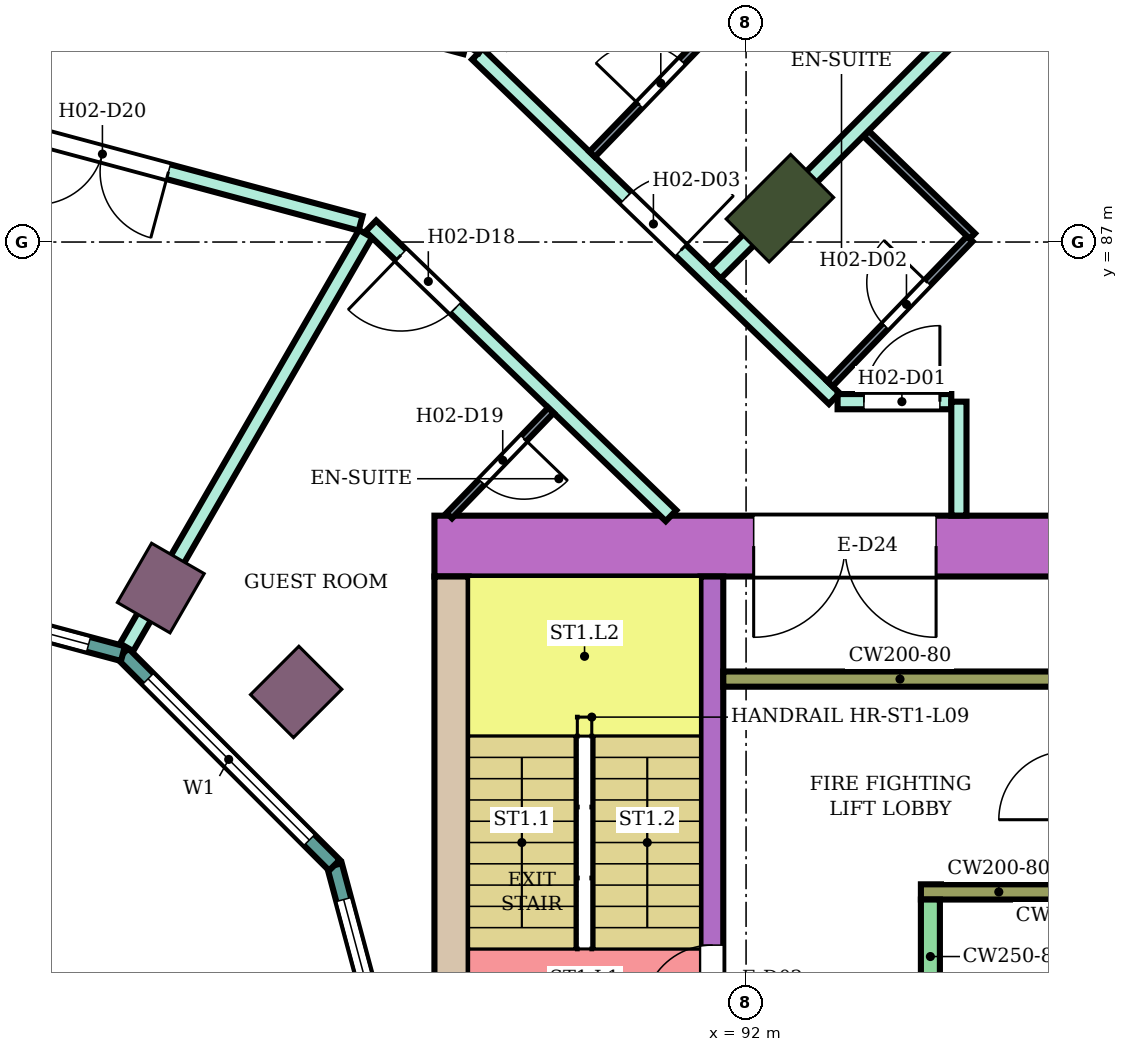
"""IFC4 building model, lengths in metres.
Left out: names, types, materials, properties, quantities, classifications, styles, units other than length and angle.
Written with IfcOpenShell. Run it as: python <this file> out.ifc"""

import sys

from ifc_helpers import new_model, si_unit, direction, frame, frame_2d, origin, origin_2d, place, context, subcontext, project, spatial, rectangle, extrude, element, fill, save


model = new_model("IFC4")
c1 = context("Model", 3, precision=1e-05, world=origin(), true_north=direction((0.0, 1.0)))
c2 = subcontext(c1, "Body", "Model", "MODEL_VIEW")
j1 = project(units=[si_unit("LENGTHUNIT", "METRE"), si_unit("PLANEANGLEUNIT", "RADIAN")], contexts=[c1])
p1 = place(None, origin())
s1 = spatial("IfcSite", under=j1, at=p1, CompositionType="ELEMENT")
p2 = place(p1, origin())
s2 = spatial("IfcBuilding", under=s1, at=p2, CompositionType="ELEMENT")
p3 = place(p2, frame((0.0, 0.0, 44.0)))
s3 = spatial("IfcBuildingStorey", under=s2, at=p3, CompositionType="ELEMENT", Elevation=44.0)
p4 = place(p3, frame((92.445, 87.445, 0.0), z_axis=(0.0, 0.0, 1.0), x_axis=(0.707106781187, 0.707106781187, 0.0)))
e1 = element("IfcColumn", 1, at=p4, inside=s3, PredefinedType="COLUMN", context=c2, shape_type="SweptSolid", body=[
    extrude(rectangle(XDim=1.2, YDim=0.8, at=origin_2d()), origin(), (0.0, 0.0, 1.0), 3.8),
])
for number, where, z_axis, x_axis in (
    (2, (86.081, 81.081, 0.0), (0.0, 0.0, 1.0), (0.707, 0.707, 0.0)),
    (3, (84.3, 82.448, 0.0), (0.0, 0.0, 1.0), (0.5, 0.866, 0.0)),
):
    element("IfcColumn", number, at=place(p3, frame(where, z_axis=z_axis, x_axis=x_axis)), inside=s3, PredefinedType="COLUMN", context=c2, shape_type="SweptSolid", body=[
        extrude(rectangle(XDim=0.9, YDim=0.8, at=origin_2d()), origin(), (0.0, 0.0, 1.0), 3.8),
    ])
p5 = place(p3, frame((95.91, 90.91, 0.0), z_axis=(0.0, 0.0, 1.0), x_axis=(0.707106781187, 0.707106781187, 0.0)))
e4 = element("IfcColumn", 4, at=p5, inside=s3, PredefinedType="COLUMN", context=c2, shape_type="SweptSolid", body=[
    extrude(rectangle(XDim=1.8, YDim=2.4, at=origin_2d()), origin(), (0.0, 0.0, 1.0), 3.8),
])
p6 = place(p3, frame((87.9, 83.0, 0.0), z_axis=(0.0, 0.0, 1.0), x_axis=(1.0, 0.0, 0.0)))
e5 = element("IfcWall", 5, at=p6, inside=s3, PredefinedType="SHEAR", context=c2, shape_type="SweptSolid", body=[
    extrude(rectangle(XDim=14.7, YDim=0.8, at=frame_2d((7.35, 0.0))), origin(), (0.0, 0.0, 1.0), 3.48),
])
p7 = place(p6, frame((4.2, 0.0, 0.0)))
e6 = element("IfcOpeningElement", 6, at=p7, cuts=e5, PredefinedType="OPENING", context=c2, shape_type="SweptSolid", body=[
    extrude(rectangle(XDim=2.4, YDim=2.4, at=frame_2d((1.2, 1.2))), frame((0.0, 0.41, 0.0), z_axis=(0.0, -1.0, 0.0), x_axis=(1.0, 0.0, 0.0)), (0.0, 0.0, 1.0), 0.82),
])
p8 = place(p3, frame((88.125, 75.0, 0.0), z_axis=(0.0, 0.0, 1.0), x_axis=(0.0, 1.0, 0.0)))
e7 = element("IfcWall", 7, at=p8, inside=s3, PredefinedType="SHEAR", context=c2, shape_type="SweptSolid", body=[
    extrude(rectangle(XDim=7.6, YDim=0.45, at=frame_2d((3.8, 0.0))), origin(), (0.0, 0.0, 1.0), 3.48),
])
p9 = place(p3, frame((91.55, 75.0, 0.0), z_axis=(0.0, 0.0, 1.0), x_axis=(0.0, 1.0, 0.0)))
e8 = element("IfcWall", 8, at=p9, inside=s3, PredefinedType="SHEAR", context=c2, shape_type="SweptSolid", body=[
    extrude(rectangle(XDim=7.6, YDim=0.3, at=frame_2d((3.8, 0.0))), origin(), (0.0, 0.0, 1.0), 3.48),
])
p10 = place(p9, frame((1.85, 0.0, 0.0)))
e9 = element("IfcOpeningElement", 9, at=p10, cuts=e8, PredefinedType="OPENING", context=c2, shape_type="SweptSolid", body=[
    extrude(rectangle(XDim=0.9, YDim=2.1, at=frame_2d((0.45, 1.05))), frame((0.0, 0.16, 0.0), z_axis=(0.0, -1.0, 0.0), x_axis=(1.0, 0.0, 0.0)), (0.0, 0.0, 1.0), 0.32),
])
p11 = place(p3, frame((91.7, 81.25, 0.0), z_axis=(0.0, 0.0, 1.0), x_axis=(1.0, 0.0, 0.0)))
e10 = element("IfcWall", 10, at=p11, inside=s3, PredefinedType="SHEAR", context=c2, shape_type="SweptSolid", body=[
    extrude(rectangle(XDim=4.65, YDim=0.2, at=frame_2d((2.325, 0.0))), origin(), (0.0, 0.0, 1.0), 3.48),
])
p12 = place(p3, frame((94.3, 78.45, 0.0), z_axis=(0.0, 0.0, 1.0), x_axis=(1.0, 0.0, 0.0)))
e11 = element("IfcWall", 11, at=p12, inside=s3, PredefinedType="SHEAR", context=c2, shape_type="SweptSolid", body=[
    extrude(rectangle(XDim=2.05, YDim=0.2, at=frame_2d((1.025, 0.0))), origin(), (0.0, 0.0, 1.0), 3.48),
])
p13 = place(p3, frame((94.425, 76.85, 0.0), z_axis=(0.0, 0.0, 1.0), x_axis=(0.0, 1.0, 0.0)))
e12 = element("IfcWall", 12, at=p13, inside=s3, PredefinedType="SHEAR", context=c2, shape_type="SweptSolid", body=[
    extrude(rectangle(XDim=1.5, YDim=0.25, at=frame_2d((0.75, 0.0))), origin(), (0.0, 0.0, 1.0), 3.48),
])
p14 = place(p3, frame((87.604, 75.0, 0.0), z_axis=(0.0, 0.0, 1.0), x_axis=(-0.258789828301, 0.965933654434, 0.0)))
e13 = element("IfcWall", 13, at=p14, inside=s3, PredefinedType="NOTDEFINED", context=c2, shape_type="SweptSolid", body=[
    extrude(rectangle(XDim=3.936, YDim=0.2, at=frame_2d((1.968, 0.0))), origin(), (0.0, 0.0, 1.0), 3.8),
])
p15 = place(p14, frame((0.468, 0.0, 0.9)))
e14 = element("IfcOpeningElement", 14, at=p15, cuts=e13, PredefinedType="OPENING", context=c2, shape_type="SweptSolid", body=[
    extrude(rectangle(XDim=3.0, YDim=2.3, at=frame_2d((1.5, 1.15))), frame((0.0, 0.11, 0.0), z_axis=(0.0, -1.0, 0.0), x_axis=(1.0, 0.0, 0.0)), (0.0, 0.0, 1.0), 0.22),
])
p16 = place(p3, frame((86.585, 78.802, 0.0), z_axis=(0.0, 0.0, 1.0), x_axis=(-0.707106781187, 0.707106781187, 0.0)))
e15 = element("IfcWall", 15, at=p16, inside=s3, PredefinedType="NOTDEFINED", context=c2, shape_type="SweptSolid", body=[
    extrude(rectangle(XDim=3.936, YDim=0.2, at=frame_2d((1.968, 0.0))), origin(), (0.0, 0.0, 1.0), 3.8),
])
p17 = place(p16, frame((0.468, 0.0, 0.9)))
e16 = element("IfcOpeningElement", 16, at=p17, cuts=e15, PredefinedType="OPENING", context=c2, shape_type="SweptSolid", body=[
    extrude(rectangle(XDim=3.0, YDim=2.3, at=frame_2d((1.5, 1.15))), frame((0.0, 0.11, 0.0), z_axis=(0.0, -1.0, 0.0), x_axis=(1.0, 0.0, 0.0)), (0.0, 0.0, 1.0), 0.22),
])
p18 = place(p3, frame((83.802, 81.585, 0.0), z_axis=(0.0, 0.0, 1.0), x_axis=(-0.965933654434, 0.258789828301, 0.0)))
e17 = element("IfcWall", 17, at=p18, inside=s3, PredefinedType="NOTDEFINED", context=c2, shape_type="SweptSolid", body=[
    extrude(rectangle(XDim=3.936, YDim=0.2, at=frame_2d((1.968, 0.0))), origin(), (0.0, 0.0, 1.0), 3.8),
])
p19 = place(p18, frame((0.468, 0.0, 0.9)))
e18 = element("IfcOpeningElement", 18, at=p19, cuts=e17, PredefinedType="OPENING", context=c2, shape_type="SweptSolid", body=[
    extrude(rectangle(XDim=3.0, YDim=2.3, at=frame_2d((1.5, 1.15))), frame((0.0, 0.11, 0.0), z_axis=(0.0, -1.0, 0.0), x_axis=(1.0, 0.0, 0.0)), (0.0, 0.0, 1.0), 0.22),
])
p20 = place(p3, frame((80.0, 89.104, 0.0), z_axis=(0.0, 0.0, 1.0), x_axis=(0.965886659739, -0.258965172444, 0.0)))
e19 = element("IfcWall", 19, at=p20, inside=s3, PredefinedType="PARTITIONING", context=c2, shape_type="SweptSolid", body=[
    extrude(rectangle(XDim=7.173, YDim=0.2, at=frame_2d((3.587, 0.0))), origin(), (0.0, 0.0, 1.0), 3.35),
])
p21 = place(p20, frame((2.757, 0.0, 0.0)))
e20 = element("IfcOpeningElement", 20, at=p21, cuts=e19, PredefinedType="OPENING", context=c2, shape_type="SweptSolid", body=[
    extrude(rectangle(XDim=1.8, YDim=2.1, at=frame_2d((0.9, 1.05))), frame((0.0, 0.11, 0.0), z_axis=(0.0, -1.0, 0.0), x_axis=(1.0, 0.0, 0.0)), (0.0, 0.0, 1.0), 0.22),
])
p22 = place(p3, frame((80.0, 91.796, 0.0), z_axis=(0.0, 0.0, 1.0), x_axis=(0.965896351823, -0.258929020266, 0.0)))
e21 = element("IfcWall", 21, at=p22, inside=s3, PredefinedType="PARTITIONING", context=c2, shape_type="SweptSolid", body=[
    extrude(rectangle(XDim=8.602, YDim=0.2, at=frame_2d((4.301, 0.0))), origin(), (0.0, 0.0, 1.0), 3.35),
])
p23 = place(p22, frame((6.055, 0.0, 0.0)))
e22 = element("IfcOpeningElement", 22, at=p23, cuts=e21, PredefinedType="OPENING", context=c2, shape_type="SweptSolid", body=[
    extrude(rectangle(XDim=0.9, YDim=2.1, at=frame_2d((0.45, 1.05))), frame((0.0, 0.11, 0.0), z_axis=(0.0, -1.0, 0.0), x_axis=(1.0, 0.0, 0.0)), (0.0, 0.0, 1.0), 0.22),
])
p24 = place(p22, frame((2.817, 0.0, 0.0)))
e23 = element("IfcOpeningElement", 23, at=p24, cuts=e21, PredefinedType="OPENING", context=c2, shape_type="SweptSolid", body=[
    extrude(rectangle(XDim=1.0, YDim=2.1, at=frame_2d((0.5, 1.05))), frame((0.0, 0.11, 0.0), z_axis=(0.0, -1.0, 0.0), x_axis=(1.0, 0.0, 0.0)), (0.0, 0.0, 1.0), 0.22),
])
p25 = place(p3, frame((83.85, 81.668, 0.0), z_axis=(0.0, 0.0, 1.0), x_axis=(0.500233583443, 0.865890502313, 0.0)))
e24 = element("IfcWall", 24, at=p25, inside=s3, PredefinedType="PARTITIONING", context=c2, shape_type="SweptSolid", body=[
    extrude(rectangle(XDim=6.284, YDim=0.2, at=frame_2d((3.142, 0.0))), origin(), (0.0, 0.0, 1.0), 3.35),
])
p26 = place(p3, frame((87.064, 87.211, 0.0), z_axis=(0.0, 0.0, 1.0), x_axis=(0.719540958932, -0.694450004262, 0.0)))
e25 = element("IfcWall", 25, at=p26, inside=s3, PredefinedType="PARTITIONING", context=c2, shape_type="SweptSolid", body=[
    extrude(rectangle(XDim=5.488, YDim=0.2, at=frame_2d((2.744, 0.0))), origin(), (0.0, 0.0, 1.0), 3.35),
])
p27 = place(p26, frame((0.55, 0.0, 0.0)))
e26 = element("IfcOpeningElement", 26, at=p27, cuts=e25, PredefinedType="OPENING", context=c2, shape_type="SweptSolid", body=[
    extrude(rectangle(XDim=1.0, YDim=2.1, at=frame_2d((0.5, 1.05))), frame((0.0, 0.11, 0.0), z_axis=(0.0, -1.0, 0.0), x_axis=(1.0, 0.0, 0.0)), (0.0, 0.0, 1.0), 0.22),
])
p28 = place(p3, frame((88.465, 89.473, 0.0), z_axis=(0.0, 0.0, 1.0), x_axis=(0.719474304909, -0.694519059908, 0.0)))
e27 = element("IfcWall", 27, at=p28, inside=s3, PredefinedType="PARTITIONING", context=c2, shape_type="SweptSolid", body=[
    extrude(rectangle(XDim=6.525, YDim=0.2, at=frame_2d((3.263, 0.0))), origin(), (0.0, 0.0, 1.0), 3.35),
])
p29 = place(p28, frame((2.719, 0.0, 0.0)))
e28 = element("IfcOpeningElement", 28, at=p29, cuts=e27, PredefinedType="OPENING", context=c2, shape_type="SweptSolid", body=[
    extrude(rectangle(XDim=1.0, YDim=2.1, at=frame_2d((0.5, 1.05))), frame((0.0, 0.11, 0.0), z_axis=(0.0, -1.0, 0.0), x_axis=(1.0, 0.0, 0.0)), (0.0, 0.0, 1.0), 0.22),
])
p30 = place(p3, frame((88.397, 89.539, 0.0), z_axis=(0.0, 0.0, 1.0), x_axis=(0.500228379329, 0.86589350876, 0.0)))
e29 = element("IfcWall", 29, at=p30, inside=s3, PredefinedType="PARTITIONING", context=c2, shape_type="SweptSolid", body=[
    extrude(rectangle(XDim=9.008, YDim=0.2, at=frame_2d((4.504, 0.0))), origin(), (0.0, 0.0, 1.0), 3.35),
])
p31 = place(p3, frame((91.595, 86.59, 0.0), z_axis=(0.0, 0.0, 1.0), x_axis=(0.707232337591, 0.706981202484, 0.0)))
e30 = element("IfcWall", 30, at=p31, inside=s3, PredefinedType="PARTITIONING", context=c2, shape_type="SweptSolid", body=[
    extrude(rectangle(XDim=6.805, YDim=0.2, at=frame_2d((3.402, 0.0))), origin(), (0.0, 0.0, 1.0), 3.35),
])
p32 = place(p3, frame((93.204, 84.9, 0.0), z_axis=(0.0, 0.0, 1.0), x_axis=(1.0, 0.0, 0.0)))
e31 = element("IfcWall", 31, at=p32, inside=s3, PredefinedType="PARTITIONING", context=c2, shape_type="SweptSolid", body=[
    extrude(rectangle(XDim=1.496, YDim=0.2, at=frame_2d((0.748, 0.0))), origin(), (0.0, 0.0, 1.0), 3.35),
])
p33 = place(p32, frame((0.346, 0.0, 0.0)))
e32 = element("IfcOpeningElement", 32, at=p33, cuts=e31, PredefinedType="OPENING", context=c2, shape_type="SweptSolid", body=[
    extrude(rectangle(XDim=1.0, YDim=2.1, at=frame_2d((0.5, 1.05))), frame((0.0, 0.11, 0.0), z_axis=(0.0, -1.0, 0.0), x_axis=(1.0, 0.0, 0.0)), (0.0, 0.0, 1.0), 0.22),
])
p34 = place(p3, frame((94.8, 83.401, 0.0), z_axis=(0.0, 0.0, 1.0), x_axis=(0.0, 1.0, 0.0)))
e33 = element("IfcWall", 33, at=p34, inside=s3, PredefinedType="PARTITIONING", context=c2, shape_type="SweptSolid", body=[
    extrude(rectangle(XDim=1.499, YDim=0.2, at=frame_2d((0.75, 0.0))), origin(), (0.0, 0.0, 1.0), 3.35),
])
p35 = place(p3, frame((88.095, 83.4, 0.0), z_axis=(0.0, 0.0, 1.0), x_axis=(0.694447472534, 0.719543402368, 0.0)))
e34 = element("IfcWall", 34, at=p35, inside=s3, PredefinedType="PARTITIONING", context=c2, shape_type="SweptSolid", body=[
    extrude(rectangle(XDim=1.926, YDim=0.1, at=frame_2d((0.963, 0.0))), origin(), (0.0, 0.0, 1.0), 3.35),
])
p36 = place(p35, frame((0.613, 0.0, 0.0)))
e35 = element("IfcOpeningElement", 35, at=p36, cuts=e34, PredefinedType="OPENING", context=c2, shape_type="SweptSolid", body=[
    extrude(rectangle(XDim=0.8, YDim=2.1, at=frame_2d((0.4, 1.05))), frame((0.0, 0.06, 0.0), z_axis=(0.0, -1.0, 0.0), x_axis=(1.0, 0.0, 0.0)), (0.0, 0.0, 1.0), 0.12),
])
p37 = place(p3, frame((89.976, 88.154, 0.0), z_axis=(0.0, 0.0, 1.0), x_axis=(0.6945137956, 0.719479386585, 0.0)))
e36 = element("IfcWall", 36, at=p37, inside=s3, PredefinedType="PARTITIONING", context=c2, shape_type="SweptSolid", body=[
    extrude(rectangle(XDim=2.699, YDim=0.1, at=frame_2d((1.35, 0.0))), origin(), (0.0, 0.0, 1.0), 3.35),
])
p38 = place(p37, frame((0.9, 0.0, 0.0)))
e37 = element("IfcOpeningElement", 37, at=p38, cuts=e36, PredefinedType="OPENING", context=c2, shape_type="SweptSolid", body=[
    extrude(rectangle(XDim=0.8, YDim=2.1, at=frame_2d((0.4, 1.05))), frame((0.0, 0.06, 0.0), z_axis=(0.0, -1.0, 0.0), x_axis=(1.0, 0.0, 0.0)), (0.0, 0.0, 1.0), 0.12),
])
p39 = place(p3, frame((93.104, 85.136, 0.0), z_axis=(0.0, 0.0, 1.0), x_axis=(0.694324808789, 0.719661767708, 0.0)))
e38 = element("IfcWall", 38, at=p39, inside=s3, PredefinedType="PARTITIONING", context=c2, shape_type="SweptSolid", body=[
    extrude(rectangle(XDim=2.65, YDim=0.1, at=frame_2d((1.325, 0.0))), origin(), (0.0, 0.0, 1.0), 3.35),
])
p40 = place(p39, frame((1.05, 0.0, 0.0)))
e39 = element("IfcOpeningElement", 39, at=p40, cuts=e38, PredefinedType="OPENING", context=c2, shape_type="SweptSolid", body=[
    extrude(rectangle(XDim=0.8, YDim=2.1, at=frame_2d((0.4, 1.05))), frame((0.0, 0.06, 0.0), z_axis=(0.0, -1.0, 0.0), x_axis=(1.0, 0.0, 0.0)), (0.0, 0.0, 1.0), 0.12),
])
p41 = place(p3, frame((93.582, 88.425, 0.0), z_axis=(0.0, 0.0, 1.0), x_axis=(0.719334224501, -0.694664144361, 0.0)))
e40 = element("IfcWall", 40, at=p41, inside=s3, PredefinedType="PARTITIONING", context=c2, shape_type="SweptSolid", body=[
    extrude(rectangle(XDim=1.94, YDim=0.1, at=frame_2d((0.97, 0.0))), origin(), (0.0, 0.0, 1.0), 3.35),
])
p42 = place(p15, origin())
e41 = element("IfcWindow", 41, at=p42, inside=s3, PartitioningType="SINGLE_PANEL", PredefinedType="WINDOW", context=c2, shape_type="SweptSolid", body=[
    extrude(rectangle(XDim=3.0, YDim=2.3, at=frame_2d((1.5, 1.15))), frame((0.0, 0.03, 0.0), z_axis=(0.0, -1.0, 0.0), x_axis=(1.0, 0.0, 0.0)), (0.0, 0.0, 1.0), 0.06),
])
fill(e14, e41)
p43 = place(p17, origin())
e42 = element("IfcWindow", 42, at=p43, inside=s3, PartitioningType="SINGLE_PANEL", PredefinedType="WINDOW", context=c2, shape_type="SweptSolid", body=[
    extrude(rectangle(XDim=3.0, YDim=2.3, at=frame_2d((1.5, 1.15))), frame((0.0, 0.03, 0.0), z_axis=(0.0, -1.0, 0.0), x_axis=(1.0, 0.0, 0.0)), (0.0, 0.0, 1.0), 0.06),
])
fill(e16, e42)
p44 = place(p19, origin())
e43 = element("IfcWindow", 43, at=p44, inside=s3, PartitioningType="SINGLE_PANEL", PredefinedType="WINDOW", context=c2, shape_type="SweptSolid", body=[
    extrude(rectangle(XDim=3.0, YDim=2.3, at=frame_2d((1.5, 1.15))), frame((0.0, 0.03, 0.0), z_axis=(0.0, -1.0, 0.0), x_axis=(1.0, 0.0, 0.0)), (0.0, 0.0, 1.0), 0.06),
])
fill(e18, e43)
p45 = place(p33, origin())
e44 = element("IfcDoor", 44, at=p45, inside=s3, OperationType="SINGLE_SWING_RIGHT", PredefinedType="DOOR", context=c2, shape_type="SweptSolid", body=[
    extrude(rectangle(XDim=1.0, YDim=2.1, at=frame_2d((0.5, 1.05))), frame((0.0, 0.025, 0.0), z_axis=(0.0, -1.0, 0.0), x_axis=(1.0, 0.0, 0.0)), (0.0, 0.0, 1.0), 0.05),
])
fill(e32, e44)
p46 = place(p40, origin())
e45 = element("IfcDoor", 45, at=p46, inside=s3, OperationType="SINGLE_SWING_RIGHT", PredefinedType="DOOR", context=c2, shape_type="SweptSolid", body=[
    extrude(rectangle(XDim=0.8, YDim=2.1, at=frame_2d((0.4, 1.05))), frame((0.0, 0.025, 0.0), z_axis=(0.0, -1.0, 0.0), x_axis=(1.0, 0.0, 0.0)), (0.0, 0.0, 1.0), 0.05),
])
fill(e39, e45)
p47 = place(p29, origin())
e46 = element("IfcDoor", 46, at=p47, inside=s3, OperationType="SINGLE_SWING_RIGHT", PredefinedType="DOOR", context=c2, shape_type="SweptSolid", body=[
    extrude(rectangle(XDim=1.0, YDim=2.1, at=frame_2d((0.5, 1.05))), frame((0.0, 0.025, 0.0), z_axis=(0.0, -1.0, 0.0), x_axis=(1.0, 0.0, 0.0)), (0.0, 0.0, 1.0), 0.05),
])
fill(e28, e46)
p48 = place(p38, origin())
e47 = element("IfcDoor", 47, at=p48, inside=s3, OperationType="SINGLE_SWING_LEFT", PredefinedType="DOOR", context=c2, shape_type="SweptSolid", body=[
    extrude(rectangle(XDim=0.8, YDim=2.1, at=frame_2d((0.4, 1.05))), frame((0.0, 0.025, 0.0), z_axis=(0.0, -1.0, 0.0), x_axis=(1.0, 0.0, 0.0)), (0.0, 0.0, 1.0), 0.05),
])
fill(e37, e47)
p49 = place(p27, frame((1.0, 0.0, 0.0), z_axis=(0.0, 0.0, 1.0), x_axis=(-1.0, 0.0, 0.0)))
e48 = element("IfcDoor", 48, at=p49, inside=s3, OperationType="SINGLE_SWING_RIGHT", PredefinedType="DOOR", context=c2, shape_type="SweptSolid", body=[
    extrude(rectangle(XDim=1.0, YDim=2.1, at=frame_2d((0.5, 1.05))), frame((0.0, 0.025, 0.0), z_axis=(0.0, -1.0, 0.0), x_axis=(1.0, 0.0, 0.0)), (0.0, 0.0, 1.0), 0.05),
])
fill(e26, e48)
p50 = place(p36, frame((0.8, 0.0, 0.0), z_axis=(0.0, 0.0, 1.0), x_axis=(-1.0, 0.0, 0.0)))
e49 = element("IfcDoor", 49, at=p50, inside=s3, OperationType="SINGLE_SWING_LEFT", PredefinedType="DOOR", context=c2, shape_type="SweptSolid", body=[
    extrude(rectangle(XDim=0.8, YDim=2.1, at=frame_2d((0.4, 1.05))), frame((0.0, 0.025, 0.0), z_axis=(0.0, -1.0, 0.0), x_axis=(1.0, 0.0, 0.0)), (0.0, 0.0, 1.0), 0.05),
])
fill(e35, e49)
p51 = place(p21, frame((1.8, 0.0, 0.0), z_axis=(0.0, 0.0, 1.0), x_axis=(-1.0, 0.0, 0.0)))
e50 = element("IfcDoor", 50, at=p51, inside=s3, OperationType="DOUBLE_DOOR_SINGLE_SWING", PredefinedType="DOOR", context=c2, shape_type="SweptSolid", body=[
    extrude(rectangle(XDim=1.8, YDim=2.1, at=frame_2d((0.9, 1.05))), frame((0.0, 0.025, 0.0), z_axis=(0.0, -1.0, 0.0), x_axis=(1.0, 0.0, 0.0)), (0.0, 0.0, 1.0), 0.05),
])
fill(e20, e50)
p52 = place(p10, origin())
e51 = element("IfcDoor", 51, at=p52, inside=s3, OperationType="SINGLE_SWING_LEFT", PredefinedType="DOOR", context=c2, shape_type="SweptSolid", body=[
    extrude(rectangle(XDim=0.9, YDim=2.1, at=frame_2d((0.45, 1.05))), frame((0.0, 0.025, 0.0), z_axis=(0.0, -1.0, 0.0), x_axis=(1.0, 0.0, 0.0)), (0.0, 0.0, 1.0), 0.05),
])
fill(e9, e51)
p53 = place(p7, frame((2.4, 0.0, 0.0), z_axis=(0.0, 0.0, 1.0), x_axis=(-1.0, 0.0, 0.0)))
e52 = element("IfcDoor", 52, at=p53, inside=s3, OperationType="DOUBLE_DOOR_SINGLE_SWING", PredefinedType="DOOR", context=c2, shape_type="SweptSolid", body=[
    extrude(rectangle(XDim=2.4, YDim=2.4, at=frame_2d((1.2, 1.2))), frame((0.0, 0.025, 0.0), z_axis=(0.0, -1.0, 0.0), x_axis=(1.0, 0.0, 0.0)), (0.0, 0.0, 1.0), 0.05),
])
fill(e6, e52)
save(model, sys.argv[1])
